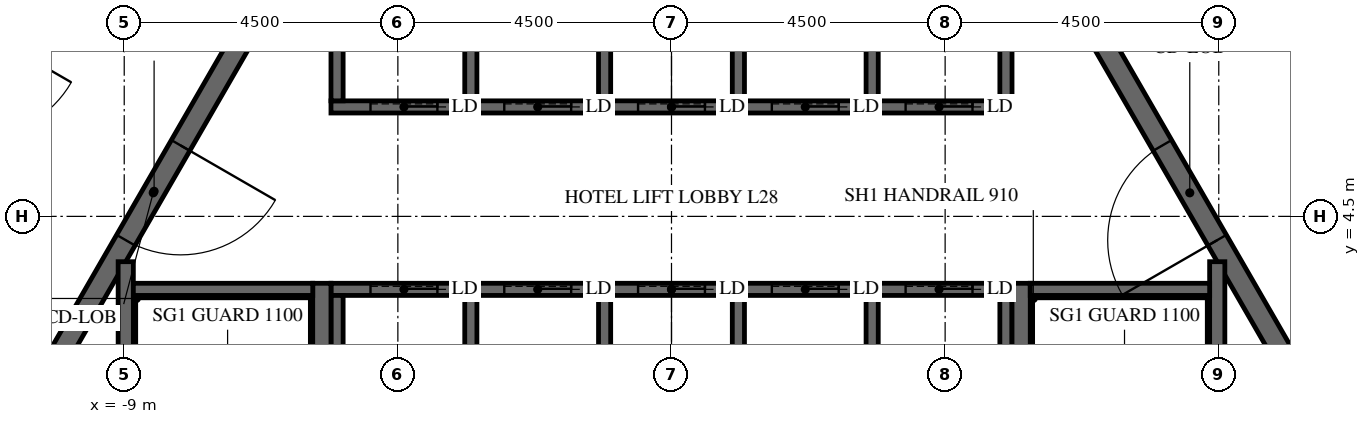
"""IFC4 building model, lengths in metres.
Left out: names, types, materials, properties, quantities, classifications, styles, units other than length and angle.
Written with IfcOpenShell. Run it as: python <this file> out.ifc"""

import sys

from ifc_helpers import new_model, si_unit, direction, frame, frame_2d, origin, place, context, subcontext, project, spatial, polyline, rectangle, outline, extrude, element, fill, save


model = new_model("IFC4")
c1 = context("Model", 3, precision=1e-05, world=origin(), true_north=direction((0.0, 1.0)))
c2 = subcontext(c1, "Body", "Model", "MODEL_VIEW")
j1 = project(units=[si_unit("LENGTHUNIT", "METRE"), si_unit("PLANEANGLEUNIT", "RADIAN")], contexts=[c1])
p1 = place(None, origin())
s1 = spatial("IfcSite", under=j1, at=p1, CompositionType="ELEMENT")
p2 = place(p1, origin())
s2 = spatial("IfcBuilding", under=s1, at=p2, CompositionType="ELEMENT")
p3 = place(p2, frame((0.0, 0.0, 123.3)))
s3 = spatial("IfcBuildingStorey", under=s2, at=p3, CompositionType="ELEMENT", Elevation=123.3)
p4 = place(p3, frame((-7.91, 13.7, -0.15), z_axis=(0.0, 0.0, 1.0), x_axis=(-0.499999880136, -0.866025472988, 0.0)))
e1 = element("IfcWall", 1, at=p4, inside=s3, PredefinedType="SHEAR", context=c2, shape_type="SweptSolid", body=[
    extrude(outline(polyline([(-0.173, -0.3), (15.993, -0.3), (15.646, 0.3), (0.173, 0.3), (-0.173, -0.3)])), origin(), (0.0, 0.0, 1.0), 3.9),
])
p5 = place(p4, frame((7.039, 0.0, 0.15)))
e2 = element("IfcOpeningElement", 2, at=p5, cuts=e1, PredefinedType="OPENING", context=c2, shape_type="SweptSolid", body=[
    extrude(rectangle(XDim=1.8, YDim=2.4, at=frame_2d((0.9, 1.2))), frame((0.0, 0.31, 0.0), z_axis=(0.0, -1.0, 0.0), x_axis=(1.0, 0.0, 0.0)), (0.0, 0.0, 1.0), 0.62),
])
p6 = place(p3, frame((15.819, 0.0, -0.15), z_axis=(0.0, 0.0, 1.0), x_axis=(-0.499999880136, 0.866025472988, 0.0)))
e3 = element("IfcWall", 3, at=p6, inside=s3, PredefinedType="SHEAR", context=c2, shape_type="SweptSolid", body=[
    extrude(outline(polyline([(-0.173, -0.3), (15.993, -0.3), (15.646, 0.3), (0.173, 0.3), (-0.173, -0.3)])), origin(), (0.0, 0.0, 1.0), 3.9),
])
p7 = place(p6, frame((6.981, 0.0, 0.15)))
e4 = element("IfcOpeningElement", 4, at=p7, cuts=e3, PredefinedType="OPENING", context=c2, shape_type="SweptSolid", body=[
    extrude(rectangle(XDim=1.8, YDim=2.4, at=frame_2d((0.9, 1.2))), frame((0.0, 0.31, 0.0), z_axis=(0.0, -1.0, 0.0), x_axis=(1.0, 0.0, 0.0)), (0.0, 0.0, 1.0), 0.62),
])
p8 = place(p3, frame((-5.673, 9.825, -0.15), z_axis=(0.0, 0.0, 1.0), x_axis=(-0.499995046907, -0.866028263435, 0.0)))
e5 = element("IfcWall", 5, at=p8, inside=s3, PredefinedType="SHEAR", context=c2, shape_type="SweptSolid", body=[
    extrude(outline(polyline([(-0.101, -0.175), (11.446, -0.175), (11.244, 0.175), (0.101, 0.175), (-0.101, -0.175)])), origin(), (0.0, 0.0, 1.0), 3.9),
])
p9 = place(p8, frame((4.801, 0.0, 0.15)))
e6 = element("IfcOpeningElement", 6, at=p9, cuts=e5, PredefinedType="OPENING", context=c2, shape_type="SweptSolid", body=[
    extrude(rectangle(XDim=1.8, YDim=2.4, at=frame_2d((0.9, 1.2))), frame((0.0, 0.185, 0.0), z_axis=(0.0, -1.0, 0.0), x_axis=(1.0, 0.0, 0.0)), (0.0, 0.0, 1.0), 0.37),
])
p10 = place(p3, frame((11.345, 0.0, -0.15), z_axis=(0.0, 0.0, 1.0), x_axis=(-0.499995046907, 0.866028263435, 0.0)))
e7 = element("IfcWall", 7, at=p10, inside=s3, PredefinedType="SHEAR", context=c2, shape_type="SweptSolid", body=[
    extrude(outline(polyline([(-0.101, -0.175), (11.446, -0.175), (11.244, 0.175), (0.101, 0.175), (-0.101, -0.175)])), origin(), (0.0, 0.0, 1.0), 3.9),
])
p11 = place(p10, frame((4.744, 0.0, 0.15)))
e8 = element("IfcOpeningElement", 8, at=p11, cuts=e7, PredefinedType="OPENING", context=c2, shape_type="SweptSolid", body=[
    extrude(rectangle(XDim=1.8, YDim=2.4, at=frame_2d((0.9, 1.2))), frame((0.0, 0.185, 0.0), z_axis=(0.0, -1.0, 0.0), x_axis=(1.0, 0.0, 0.0)), (0.0, 0.0, 1.0), 0.37),
])
p12 = place(p3, frame((-5.6, 6.3, -0.25), z_axis=(0.0, 0.0, 1.0), x_axis=(1.0, 0.0, 0.0)))
e9 = element("IfcWall", 9, at=p12, inside=s3, PredefinedType="SHEAR", context=c2, shape_type="SweptSolid", body=[
    extrude(rectangle(XDim=11.2, YDim=0.2, at=frame_2d((5.6, 0.0))), origin(), (0.0, 0.0, 1.0), 3.9),
])
p13 = place(p12, frame((0.65, 0.0, 0.25)))
e10 = element("IfcOpeningElement", 10, at=p13, cuts=e9, PredefinedType="OPENING", context=c2, shape_type="SweptSolid", body=[
    extrude(rectangle(XDim=1.1, YDim=2.1, at=frame_2d((0.55, 1.05))), frame((0.0, 0.11, 0.0), z_axis=(0.0, -1.0, 0.0), x_axis=(1.0, 0.0, 0.0)), (0.0, 0.0, 1.0), 0.22),
])
p14 = place(p12, frame((2.85, 0.0, 0.25)))
e11 = element("IfcOpeningElement", 11, at=p14, cuts=e9, PredefinedType="OPENING", context=c2, shape_type="SweptSolid", body=[
    extrude(rectangle(XDim=1.1, YDim=2.1, at=frame_2d((0.55, 1.05))), frame((0.0, 0.11, 0.0), z_axis=(0.0, -1.0, 0.0), x_axis=(1.0, 0.0, 0.0)), (0.0, 0.0, 1.0), 0.22),
])
p15 = place(p12, frame((5.05, 0.0, 0.25)))
e12 = element("IfcOpeningElement", 12, at=p15, cuts=e9, PredefinedType="OPENING", context=c2, shape_type="SweptSolid", body=[
    extrude(rectangle(XDim=1.1, YDim=2.1, at=frame_2d((0.55, 1.05))), frame((0.0, 0.11, 0.0), z_axis=(0.0, -1.0, 0.0), x_axis=(1.0, 0.0, 0.0)), (0.0, 0.0, 1.0), 0.22),
])
p16 = place(p12, frame((7.25, 0.0, 0.25)))
e13 = element("IfcOpeningElement", 13, at=p16, cuts=e9, PredefinedType="OPENING", context=c2, shape_type="SweptSolid", body=[
    extrude(rectangle(XDim=1.1, YDim=2.1, at=frame_2d((0.55, 1.05))), frame((0.0, 0.11, 0.0), z_axis=(0.0, -1.0, 0.0), x_axis=(1.0, 0.0, 0.0)), (0.0, 0.0, 1.0), 0.22),
])
p17 = place(p12, frame((9.45, 0.0, 0.25)))
e14 = element("IfcOpeningElement", 14, at=p17, cuts=e9, PredefinedType="OPENING", context=c2, shape_type="SweptSolid", body=[
    extrude(rectangle(XDim=1.1, YDim=2.1, at=frame_2d((0.55, 1.05))), frame((0.0, 0.11, 0.0), z_axis=(0.0, -1.0, 0.0), x_axis=(1.0, 0.0, 0.0)), (0.0, 0.0, 1.0), 0.22),
])
for number, where, z_axis, x_axis in (
    (15, (-5.5, 6.4, -0.25), (0.0, 0.0, 1.0), (0.0, 1.0, 0.0)),
    (16, (-3.3, 6.4, -0.25), (0.0, 0.0, 1.0), (0.0, 1.0, 0.0)),
    (17, (-1.1, 6.4, -0.25), (0.0, 0.0, 1.0), (0.0, 1.0, 0.0)),
    (18, (1.1, 6.4, -0.25), (0.0, 0.0, 1.0), (0.0, 1.0, 0.0)),
    (19, (3.3, 6.4, -0.25), (0.0, 0.0, 1.0), (0.0, 1.0, 0.0)),
    (20, (5.5, 6.4, -0.25), (0.0, 0.0, 1.0), (0.0, 1.0, 0.0)),
):
    element("IfcWall", number, at=place(p3, frame(where, z_axis=z_axis, x_axis=x_axis)), inside=s3, PredefinedType="SHEAR", context=c2, shape_type="SweptSolid", body=[
        extrude(rectangle(XDim=2.9, YDim=0.2, at=frame_2d((1.45, 0.0))), origin(), (0.0, 0.0, 1.0), 3.9),
    ])
p18 = place(p3, frame((-5.6, 3.3, -0.25), z_axis=(0.0, 0.0, 1.0), x_axis=(1.0, 0.0, 0.0)))
e21 = element("IfcWall", 21, at=p18, inside=s3, PredefinedType="SHEAR", context=c2, shape_type="SweptSolid", body=[
    extrude(rectangle(XDim=11.2, YDim=0.2, at=frame_2d((5.6, 0.0))), origin(), (0.0, 0.0, 1.0), 3.9),
])
p19 = place(p18, frame((0.65, 0.0, 0.25)))
e22 = element("IfcOpeningElement", 22, at=p19, cuts=e21, PredefinedType="OPENING", context=c2, shape_type="SweptSolid", body=[
    extrude(rectangle(XDim=1.1, YDim=2.1, at=frame_2d((0.55, 1.05))), frame((0.0, 0.11, 0.0), z_axis=(0.0, -1.0, 0.0), x_axis=(1.0, 0.0, 0.0)), (0.0, 0.0, 1.0), 0.22),
])
p20 = place(p18, frame((2.85, 0.0, 0.25)))
e23 = element("IfcOpeningElement", 23, at=p20, cuts=e21, PredefinedType="OPENING", context=c2, shape_type="SweptSolid", body=[
    extrude(rectangle(XDim=1.1, YDim=2.1, at=frame_2d((0.55, 1.05))), frame((0.0, 0.11, 0.0), z_axis=(0.0, -1.0, 0.0), x_axis=(1.0, 0.0, 0.0)), (0.0, 0.0, 1.0), 0.22),
])
p21 = place(p18, frame((5.05, 0.0, 0.25)))
e24 = element("IfcOpeningElement", 24, at=p21, cuts=e21, PredefinedType="OPENING", context=c2, shape_type="SweptSolid", body=[
    extrude(rectangle(XDim=1.1, YDim=2.1, at=frame_2d((0.55, 1.05))), frame((0.0, 0.11, 0.0), z_axis=(0.0, -1.0, 0.0), x_axis=(1.0, 0.0, 0.0)), (0.0, 0.0, 1.0), 0.22),
])
p22 = place(p18, frame((7.25, 0.0, 0.25)))
e25 = element("IfcOpeningElement", 25, at=p22, cuts=e21, PredefinedType="OPENING", context=c2, shape_type="SweptSolid", body=[
    extrude(rectangle(XDim=1.1, YDim=2.1, at=frame_2d((0.55, 1.05))), frame((0.0, 0.11, 0.0), z_axis=(0.0, -1.0, 0.0), x_axis=(1.0, 0.0, 0.0)), (0.0, 0.0, 1.0), 0.22),
])
p23 = place(p18, frame((9.45, 0.0, 0.25)))
e26 = element("IfcOpeningElement", 26, at=p23, cuts=e21, PredefinedType="OPENING", context=c2, shape_type="SweptSolid", body=[
    extrude(rectangle(XDim=1.1, YDim=2.1, at=frame_2d((0.55, 1.05))), frame((0.0, 0.11, 0.0), z_axis=(0.0, -1.0, 0.0), x_axis=(1.0, 0.0, 0.0)), (0.0, 0.0, 1.0), 0.22),
])
for number, where, z_axis, x_axis in (
    (27, (-5.5, 0.1, -0.25), (0.0, 0.0, 1.0), (0.0, 1.0, 0.0)),
    (28, (-3.3, 0.1, -0.25), (0.0, 0.0, 1.0), (0.0, 1.0, 0.0)),
    (29, (-1.1, 0.1, -0.25), (0.0, 0.0, 1.0), (0.0, 1.0, 0.0)),
    (30, (1.1, 0.1, -0.25), (0.0, 0.0, 1.0), (0.0, 1.0, 0.0)),
    (31, (3.3, 0.1, -0.25), (0.0, 0.0, 1.0), (0.0, 1.0, 0.0)),
    (32, (5.5, 0.1, -0.25), (0.0, 0.0, 1.0), (0.0, 1.0, 0.0)),
):
    element("IfcWall", number, at=place(p3, frame(where, z_axis=z_axis, x_axis=x_axis)), inside=s3, PredefinedType="SHEAR", context=c2, shape_type="SweptSolid", body=[
        extrude(rectangle(XDim=3.1, YDim=0.2, at=frame_2d((1.55, 0.0))), origin(), (0.0, 0.0, 1.0), 3.9),
    ])
p24 = place(p3, frame((5.75, -3.4, -0.25), z_axis=(0.0, 0.0, 1.0), x_axis=(0.0, 1.0, 0.0)))
e33 = element("IfcWall", 33, at=p24, inside=s3, PredefinedType="SHEAR", context=c2, shape_type="SweptSolid", body=[
    extrude(rectangle(XDim=6.8, YDim=0.3, at=frame_2d((3.4, 0.0))), origin(), (0.0, 0.0, 1.0), 3.9),
])
p25 = place(p3, frame((8.975, -3.755, -0.25), z_axis=(0.0, 0.0, 1.0), x_axis=(0.0, 1.0, 0.0)))
e34 = element("IfcWall", 34, at=p25, inside=s3, PredefinedType="SHEAR", context=c2, shape_type="SweptSolid", body=[
    extrude(rectangle(XDim=7.51, YDim=0.25, at=frame_2d((3.755, 0.0))), origin(), (0.0, 0.0, 1.0), 3.9),
])
p26 = place(p3, frame((5.9, 3.3, -0.25), z_axis=(0.0, 0.0, 1.0), x_axis=(1.0, 0.0, 0.0)))
e35 = element("IfcWall", 35, at=p26, inside=s3, PredefinedType="SHEAR", context=c2, shape_type="SweptSolid", body=[
    extrude(rectangle(XDim=2.95, YDim=0.2, at=frame_2d((1.475, 0.0))), origin(), (0.0, 0.0, 1.0), 3.9),
])
p27 = place(p3, frame((-5.75, -3.4, -0.25), z_axis=(0.0, 0.0, 1.0), x_axis=(0.0, 1.0, 0.0)))
e36 = element("IfcWall", 36, at=p27, inside=s3, PredefinedType="SHEAR", context=c2, shape_type="SweptSolid", body=[
    extrude(rectangle(XDim=6.8, YDim=0.3, at=frame_2d((3.4, 0.0))), origin(), (0.0, 0.0, 1.0), 3.9),
])
p28 = place(p3, frame((-8.975, -3.755, -0.25), z_axis=(0.0, 0.0, 1.0), x_axis=(0.0, 1.0, 0.0)))
e37 = element("IfcWall", 37, at=p28, inside=s3, PredefinedType="SHEAR", context=c2, shape_type="SweptSolid", body=[
    extrude(rectangle(XDim=7.51, YDim=0.25, at=frame_2d((3.755, 0.0))), origin(), (0.0, 0.0, 1.0), 3.9),
])
p29 = place(p3, frame((-8.85, 3.3, -0.25), z_axis=(0.0, 0.0, 1.0), x_axis=(1.0, 0.0, 0.0)))
e38 = element("IfcWall", 38, at=p29, inside=s3, PredefinedType="SHEAR", context=c2, shape_type="SweptSolid", body=[
    extrude(rectangle(XDim=2.95, YDim=0.2, at=frame_2d((1.475, 0.0))), origin(), (0.0, 0.0, 1.0), 3.9),
])
p30 = place(p9, origin())
e39 = element("IfcDoor", 39, at=p30, inside=s3, OperationType="DOUBLE_DOOR_SINGLE_SWING", PredefinedType="DOOR", context=c2, shape_type="SweptSolid", body=[
    extrude(rectangle(XDim=1.8, YDim=2.4, at=frame_2d((0.9, 1.2))), frame((0.0, 0.025, 0.0), z_axis=(0.0, -1.0, 0.0), x_axis=(1.0, 0.0, 0.0)), (0.0, 0.0, 1.0), 0.05),
])
fill(e6, e39)
p31 = place(p11, origin())
e40 = element("IfcDoor", 40, at=p31, inside=s3, OperationType="DOUBLE_DOOR_SINGLE_SWING", PredefinedType="DOOR", context=c2, shape_type="SweptSolid", body=[
    extrude(rectangle(XDim=1.8, YDim=2.4, at=frame_2d((0.9, 1.2))), frame((0.0, 0.025, 0.0), z_axis=(0.0, -1.0, 0.0), x_axis=(1.0, 0.0, 0.0)), (0.0, 0.0, 1.0), 0.05),
])
fill(e8, e40)
p32 = place(p13, origin())
e41 = element("IfcDoor", 41, at=p32, inside=s3, OperationType="SLIDING_TO_LEFT", PredefinedType="DOOR", context=c2, shape_type="SweptSolid", body=[
    extrude(rectangle(XDim=1.1, YDim=2.1, at=frame_2d((0.55, 1.05))), frame((0.0, 0.025, 0.0), z_axis=(0.0, -1.0, 0.0), x_axis=(1.0, 0.0, 0.0)), (0.0, 0.0, 1.0), 0.05),
])
fill(e10, e41)
p33 = place(p14, origin())
e42 = element("IfcDoor", 42, at=p33, inside=s3, OperationType="SLIDING_TO_LEFT", PredefinedType="DOOR", context=c2, shape_type="SweptSolid", body=[
    extrude(rectangle(XDim=1.1, YDim=2.1, at=frame_2d((0.55, 1.05))), frame((0.0, 0.025, 0.0), z_axis=(0.0, -1.0, 0.0), x_axis=(1.0, 0.0, 0.0)), (0.0, 0.0, 1.0), 0.05),
])
fill(e11, e42)
p34 = place(p15, origin())
e43 = element("IfcDoor", 43, at=p34, inside=s3, OperationType="SLIDING_TO_LEFT", PredefinedType="DOOR", context=c2, shape_type="SweptSolid", body=[
    extrude(rectangle(XDim=1.1, YDim=2.1, at=frame_2d((0.55, 1.05))), frame((0.0, 0.025, 0.0), z_axis=(0.0, -1.0, 0.0), x_axis=(1.0, 0.0, 0.0)), (0.0, 0.0, 1.0), 0.05),
])
fill(e12, e43)
p35 = place(p16, origin())
e44 = element("IfcDoor", 44, at=p35, inside=s3, OperationType="SLIDING_TO_LEFT", PredefinedType="DOOR", context=c2, shape_type="SweptSolid", body=[
    extrude(rectangle(XDim=1.1, YDim=2.1, at=frame_2d((0.55, 1.05))), frame((0.0, 0.025, 0.0), z_axis=(0.0, -1.0, 0.0), x_axis=(1.0, 0.0, 0.0)), (0.0, 0.0, 1.0), 0.05),
])
fill(e13, e44)
p36 = place(p17, origin())
e45 = element("IfcDoor", 45, at=p36, inside=s3, OperationType="SLIDING_TO_LEFT", PredefinedType="DOOR", context=c2, shape_type="SweptSolid", body=[
    extrude(rectangle(XDim=1.1, YDim=2.1, at=frame_2d((0.55, 1.05))), frame((0.0, 0.025, 0.0), z_axis=(0.0, -1.0, 0.0), x_axis=(1.0, 0.0, 0.0)), (0.0, 0.0, 1.0), 0.05),
])
fill(e14, e45)
p37 = place(p19, origin())
e46 = element("IfcDoor", 46, at=p37, inside=s3, OperationType="SLIDING_TO_LEFT", PredefinedType="DOOR", context=c2, shape_type="SweptSolid", body=[
    extrude(rectangle(XDim=1.1, YDim=2.1, at=frame_2d((0.55, 1.05))), frame((0.0, 0.025, 0.0), z_axis=(0.0, -1.0, 0.0), x_axis=(1.0, 0.0, 0.0)), (0.0, 0.0, 1.0), 0.05),
])
fill(e22, e46)
p38 = place(p20, origin())
e47 = element("IfcDoor", 47, at=p38, inside=s3, OperationType="SLIDING_TO_LEFT", PredefinedType="DOOR", context=c2, shape_type="SweptSolid", body=[
    extrude(rectangle(XDim=1.1, YDim=2.1, at=frame_2d((0.55, 1.05))), frame((0.0, 0.025, 0.0), z_axis=(0.0, -1.0, 0.0), x_axis=(1.0, 0.0, 0.0)), (0.0, 0.0, 1.0), 0.05),
])
fill(e23, e47)
p39 = place(p21, origin())
e48 = element("IfcDoor", 48, at=p39, inside=s3, OperationType="SLIDING_TO_LEFT", PredefinedType="DOOR", context=c2, shape_type="SweptSolid", body=[
    extrude(rectangle(XDim=1.1, YDim=2.1, at=frame_2d((0.55, 1.05))), frame((0.0, 0.025, 0.0), z_axis=(0.0, -1.0, 0.0), x_axis=(1.0, 0.0, 0.0)), (0.0, 0.0, 1.0), 0.05),
])
fill(e24, e48)
p40 = place(p22, origin())
e49 = element("IfcDoor", 49, at=p40, inside=s3, OperationType="SLIDING_TO_LEFT", PredefinedType="DOOR", context=c2, shape_type="SweptSolid", body=[
    extrude(rectangle(XDim=1.1, YDim=2.1, at=frame_2d((0.55, 1.05))), frame((0.0, 0.025, 0.0), z_axis=(0.0, -1.0, 0.0), x_axis=(1.0, 0.0, 0.0)), (0.0, 0.0, 1.0), 0.05),
])
fill(e25, e49)
p41 = place(p23, origin())
e50 = element("IfcDoor", 50, at=p41, inside=s3, OperationType="SLIDING_TO_LEFT", PredefinedType="DOOR", context=c2, shape_type="SweptSolid", body=[
    extrude(rectangle(XDim=1.1, YDim=2.1, at=frame_2d((0.55, 1.05))), frame((0.0, 0.025, 0.0), z_axis=(0.0, -1.0, 0.0), x_axis=(1.0, 0.0, 0.0)), (0.0, 0.0, 1.0), 0.05),
])
fill(e26, e50)
save(model, sys.argv[1])
